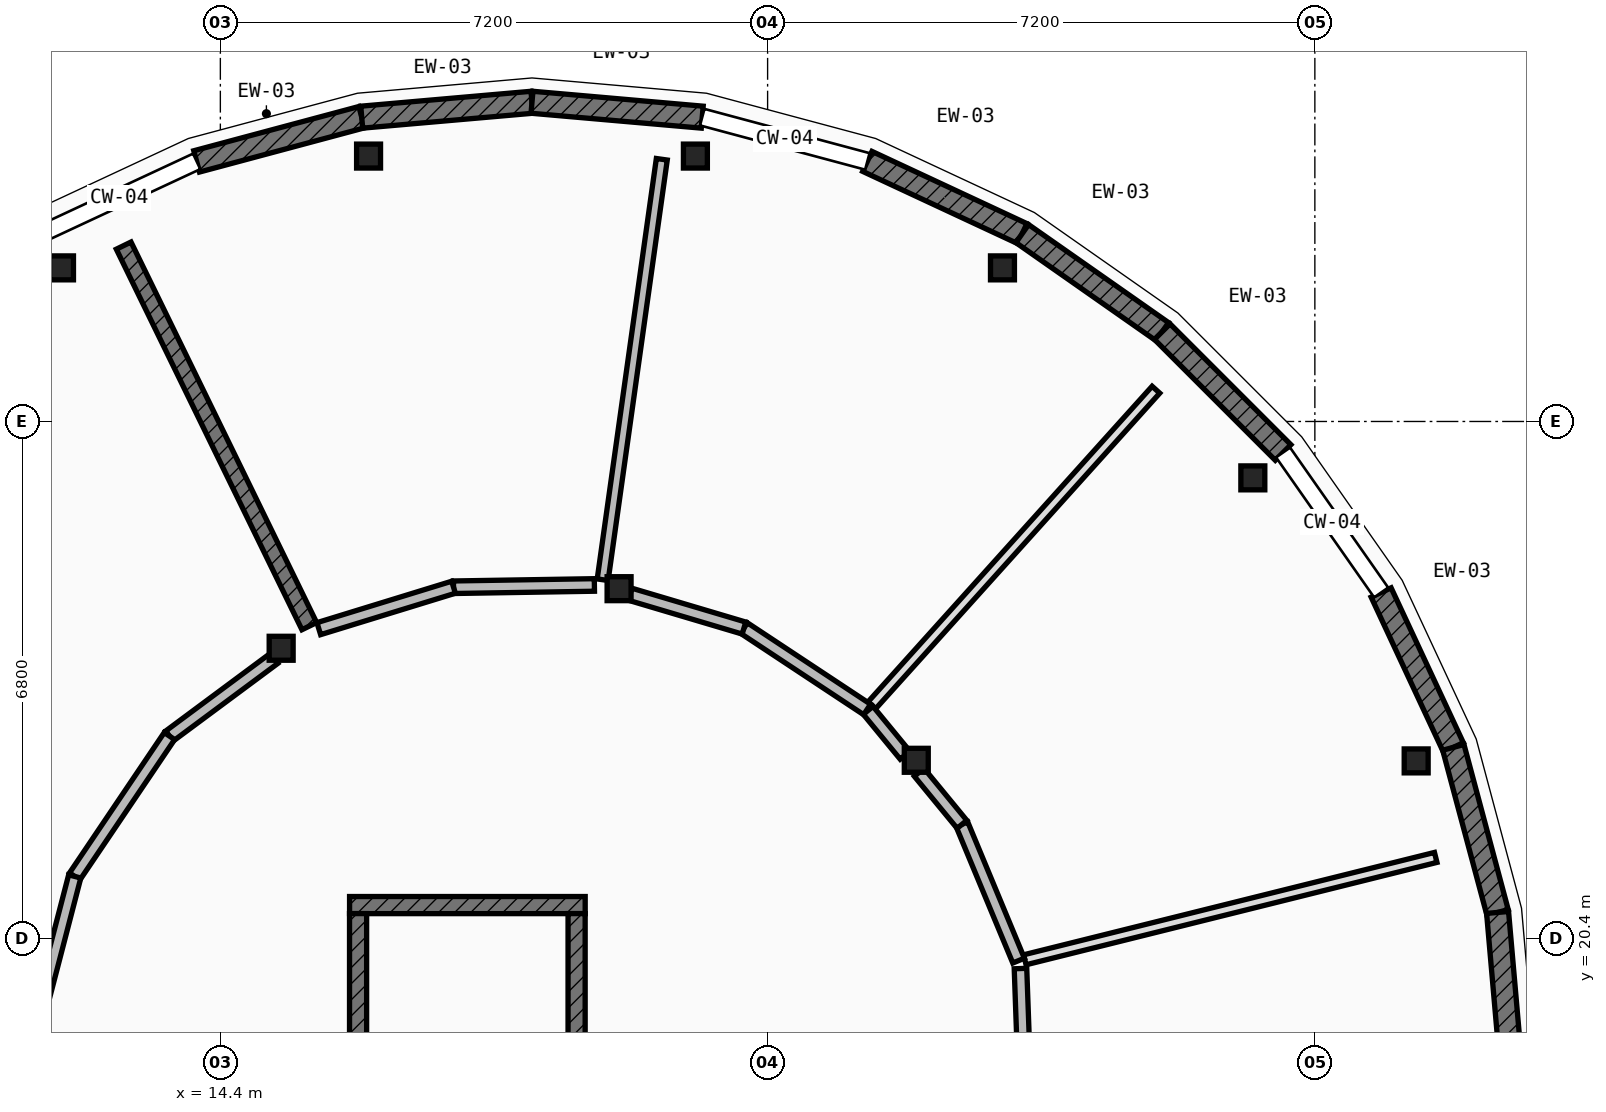
"""IFC4 building model, lengths in metres.
Left out: names, types, materials, properties, quantities, classifications, styles, units other than length and angle.
Written with IfcOpenShell. Run it as: python <this file> out.ifc"""

import sys

from ifc_helpers import new_model, si_unit, direction, frame, frame_2d, origin, origin_2d, place, context, subcontext, project, spatial, rectangle, extrude, element, fill, save


model = new_model("IFC4")
c1 = context("Model", 3, precision=1e-05, world=origin(), true_north=direction((0.0, 1.0)))
c2 = subcontext(c1, "Body", "Model", "MODEL_VIEW")
j1 = project(units=[si_unit("LENGTHUNIT", "METRE"), si_unit("PLANEANGLEUNIT", "RADIAN")], contexts=[c1])
p1 = place(None, origin())
s1 = spatial("IfcSite", under=j1, at=p1, CompositionType="ELEMENT")
p2 = place(p1, origin())
s2 = spatial("IfcBuilding", under=s1, at=p2, CompositionType="ELEMENT")
p3 = place(p2, frame((0.0, 0.0, 12.95)))
s3 = spatial("IfcBuildingStorey", under=s2, at=p3, CompositionType="ELEMENT", Elevation=12.95)
for number, where, z_axis, x_axis in (
    (1, (30.133, 22.734, 0.0), (0.0, 0.0, 1.0), (1.0, 0.0, 0.0)),
    (2, (27.984, 26.458, 0.0), (0.0, 0.0, 1.0), (1.0, 0.0, 0.0)),
    (3, (24.69, 29.221, 0.0), (0.0, 0.0, 1.0), (1.0, 0.0, 0.0)),
    (4, (20.65, 30.692, 0.0), (0.0, 0.0, 1.0), (1.0, 0.0, 0.0)),
    (5, (16.35, 30.692, 0.0), (0.0, 0.0, 1.0), (1.0, 0.0, 0.0)),
    (6, (12.31, 29.221, 0.0), (0.0, 0.0, 1.0), (1.0, 0.0, 0.0)),
    (7, (23.556, 22.742, 0.0), (0.0, 0.0, 1.0), (1.0, 0.0, 0.0)),
    (8, (19.646, 25.0, 0.0), (0.0, 0.0, 1.0), (1.0, 0.0, 0.0)),
    (9, (15.2, 24.216, 0.0), (0.0, 0.0, 1.0), (1.0, 0.0, 0.0)),
):
    element("IfcColumn", number, at=place(p3, frame(where, z_axis=z_axis, x_axis=x_axis)), inside=s3, PredefinedType="COLUMN", context=c2, shape_type="SweptSolid", body=[
        extrude(rectangle(XDim=0.315, YDim=0.315, at=origin_2d()), origin(), (0.0, 0.0, 1.0), 4.2),
    ])
p4 = place(p3, frame((14.088, 30.622, 0.0), z_axis=(0.0, 0.0, 1.0), x_axis=(0.96592430538, 0.258824721145, 0.0)))
e10 = element("IfcWall", 10, at=p4, inside=s3, PredefinedType="ELEMENTEDWALL", context=c2, shape_type="SweptSolid", body=[
    extrude(rectangle(XDim=2.249, YDim=0.29, at=frame_2d((1.125, 0.0))), origin(), (0.0, 0.0, 1.0), 3.349),
])
p5 = place(p4, frame((0.599, 0.0, 0.85)))
e11 = element("IfcOpeningElement", 11, at=p5, cuts=e10, PredefinedType="OPENING", context=c2, shape_type="SweptSolid", body=[
    extrude(rectangle(XDim=1.05, YDim=1.9, at=frame_2d((0.525, 0.95))), frame((0.0, 0.155, 0.0), z_axis=(0.0, -1.0, 0.0), x_axis=(1.0, 0.0, 0.0)), (0.0, 0.0, 1.0), 0.31),
])
p6 = place(p3, frame((16.26, 31.204, 0.0), z_axis=(0.0, 0.0, 1.0), x_axis=(0.996201374201, 0.087079400775, 0.0)))
e12 = element("IfcWall", 12, at=p6, inside=s3, PredefinedType="ELEMENTEDWALL", context=c2, shape_type="SweptSolid", body=[
    extrude(rectangle(XDim=2.249, YDim=0.29, at=frame_2d((1.124, 0.0))), origin(), (0.0, 0.0, 1.0), 3.349),
])
p7 = place(p6, frame((0.599, 0.0, 0.85)))
e13 = element("IfcOpeningElement", 13, at=p7, cuts=e12, PredefinedType="OPENING", context=c2, shape_type="SweptSolid", body=[
    extrude(rectangle(XDim=1.05, YDim=2.15, at=frame_2d((0.525, 1.075))), frame((0.0, 0.155, 0.0), z_axis=(0.0, -1.0, 0.0), x_axis=(1.0, 0.0, 0.0)), (0.0, 0.0, 1.0), 0.31),
])
p8 = place(p3, frame((18.5, 31.4, 0.0), z_axis=(0.0, 0.0, 1.0), x_axis=(0.996201374201, -0.087079400775, 0.0)))
e14 = element("IfcWall", 14, at=p8, inside=s3, PredefinedType="ELEMENTEDWALL", context=c2, shape_type="SweptSolid", body=[
    extrude(rectangle(XDim=2.249, YDim=0.29, at=frame_2d((1.124, 0.0))), origin(), (0.0, 0.0, 1.0), 3.349),
])
p9 = place(p8, frame((0.584, 0.0, 0.85)))
e15 = element("IfcOpeningElement", 15, at=p9, cuts=e14, PredefinedType="OPENING", context=c2, shape_type="SweptSolid", body=[
    extrude(rectangle(XDim=1.08, YDim=1.5, at=frame_2d((0.54, 0.75))), frame((0.0, 0.155, 0.0), z_axis=(0.0, -1.0, 0.0), x_axis=(1.0, 0.0, 0.0)), (0.0, 0.0, 1.0), 0.31),
])
p10 = place(p3, frame((22.912, 30.622, 0.0), z_axis=(0.0, 0.0, 1.0), x_axis=(0.906360600886, -0.422504983593, 0.0)))
e16 = element("IfcWall", 16, at=p10, inside=s3, PredefinedType="ELEMENTEDWALL", context=c2, shape_type="SweptSolid", body=[
    extrude(rectangle(XDim=2.248, YDim=0.29, at=frame_2d((1.124, 0.0))), origin(), (0.0, 0.0, 1.0), 3.349),
])
p11 = place(p10, frame((0.584, 0.0, 0.85)))
e17 = element("IfcOpeningElement", 17, at=p11, cuts=e16, PredefinedType="OPENING", context=c2, shape_type="SweptSolid", body=[
    extrude(rectangle(XDim=1.08, YDim=1.8, at=frame_2d((0.54, 0.9))), frame((0.0, 0.155, 0.0), z_axis=(0.0, -1.0, 0.0), x_axis=(1.0, 0.0, 0.0)), (0.0, 0.0, 1.0), 0.31),
])
p12 = place(p3, frame((24.95, 29.672, 0.0), z_axis=(0.0, 0.0, 1.0), x_axis=(0.819104393925, -0.573644482107, 0.0)))
e18 = element("IfcWall", 18, at=p12, inside=s3, PredefinedType="ELEMENTEDWALL", context=c2, shape_type="SweptSolid", body=[
    extrude(rectangle(XDim=2.249, YDim=0.29, at=frame_2d((1.125, 0.0))), origin(), (0.0, 0.0, 1.0), 3.349),
])
p13 = place(p12, frame((0.574, 0.0, 0.85)))
e19 = element("IfcOpeningElement", 19, at=p13, cuts=e18, PredefinedType="OPENING", context=c2, shape_type="SweptSolid", body=[
    extrude(rectangle(XDim=1.1, YDim=1.25, at=frame_2d((0.55, 0.625))), frame((0.0, 0.155, 0.0), z_axis=(0.0, -1.0, 0.0), x_axis=(1.0, 0.0, 0.0)), (0.0, 0.0, 1.0), 0.31),
])
p14 = place(p3, frame((26.792, 28.382, 0.0), z_axis=(0.0, 0.0, 1.0), x_axis=(0.707106781187, -0.707106781187, 0.0)))
e20 = element("IfcWall", 20, at=p14, inside=s3, PredefinedType="ELEMENTEDWALL", context=c2, shape_type="SweptSolid", body=[
    extrude(rectangle(XDim=2.249, YDim=0.29, at=frame_2d((1.125, 0.0))), origin(), (0.0, 0.0, 1.0), 3.349),
])
p15 = place(p14, frame((0.574, 0.0, 0.85)))
e21 = element("IfcOpeningElement", 21, at=p15, cuts=e20, PredefinedType="OPENING", context=c2, shape_type="SweptSolid", body=[
    extrude(rectangle(XDim=1.1, YDim=1.5, at=frame_2d((0.55, 0.75))), frame((0.0, 0.155, 0.0), z_axis=(0.0, -1.0, 0.0), x_axis=(1.0, 0.0, 0.0)), (0.0, 0.0, 1.0), 0.31),
])
p16 = place(p3, frame((29.672, 24.95, 0.0), z_axis=(0.0, 0.0, 1.0), x_axis=(0.422504983593, -0.906360600886, 0.0)))
e22 = element("IfcWall", 22, at=p16, inside=s3, PredefinedType="ELEMENTEDWALL", context=c2, shape_type="SweptSolid", body=[
    extrude(rectangle(XDim=2.248, YDim=0.29, at=frame_2d((1.124, 0.0))), origin(), (0.0, 0.0, 1.0), 3.349),
])
p17 = place(p16, frame((0.574, 0.0, 0.85)))
e23 = element("IfcOpeningElement", 23, at=p17, cuts=e22, PredefinedType="OPENING", context=c2, shape_type="SweptSolid", body=[
    extrude(rectangle(XDim=1.1, YDim=1.85, at=frame_2d((0.55, 0.925))), frame((0.0, 0.155, 0.0), z_axis=(0.0, -1.0, 0.0), x_axis=(1.0, 0.0, 0.0)), (0.0, 0.0, 1.0), 0.31),
])
p18 = place(p3, frame((30.622, 22.912, 0.0), z_axis=(0.0, 0.0, 1.0), x_axis=(0.258824721145, -0.96592430538, 0.0)))
e24 = element("IfcWall", 24, at=p18, inside=s3, PredefinedType="ELEMENTEDWALL", context=c2, shape_type="SweptSolid", body=[
    extrude(rectangle(XDim=2.249, YDim=0.29, at=frame_2d((1.125, 0.0))), origin(), (0.0, 0.0, 1.0), 3.349),
])
p19 = place(p18, frame((0.574, 0.0, 0.85)))
e25 = element("IfcOpeningElement", 25, at=p19, cuts=e24, PredefinedType="OPENING", context=c2, shape_type="SweptSolid", body=[
    extrude(rectangle(XDim=1.1, YDim=2.1, at=frame_2d((0.55, 1.05))), frame((0.0, 0.155, 0.0), z_axis=(0.0, -1.0, 0.0), x_axis=(1.0, 0.0, 0.0)), (0.0, 0.0, 1.0), 0.31),
])
p20 = place(p3, frame((31.204, 20.74, 0.0), z_axis=(0.0, 0.0, 1.0), x_axis=(0.087079400775, -0.996201374201, 0.0)))
e26 = element("IfcWall", 26, at=p20, inside=s3, PredefinedType="ELEMENTEDWALL", context=c2, shape_type="SweptSolid", body=[
    extrude(rectangle(XDim=2.249, YDim=0.29, at=frame_2d((1.124, 0.0))), origin(), (0.0, 0.0, 1.0), 3.349),
])
p21 = place(p20, frame((0.564, 0.0, 0.85)))
e27 = element("IfcOpeningElement", 27, at=p21, cuts=e26, PredefinedType="OPENING", context=c2, shape_type="SweptSolid", body=[
    extrude(rectangle(XDim=1.12, YDim=1.65, at=frame_2d((0.56, 0.825))), frame((0.0, 0.155, 0.0), z_axis=(0.0, -1.0, 0.0), x_axis=(1.0, 0.0, 0.0)), (0.0, 0.0, 1.0), 0.31),
])
p22 = place(p3, frame((16.1, 20.837, 0.0), z_axis=(0.0, 0.0, 1.0), x_axis=(1.0, 0.0, 0.0)))
e28 = element("IfcWall", 28, at=p22, inside=s3, PredefinedType="SHEAR", context=c2, shape_type="SweptSolid", body=[
    extrude(rectangle(XDim=3.1, YDim=0.225, at=frame_2d((1.55, 0.0))), origin(), (0.0, 0.0, 1.0), 3.995),
])
for number, where, z_axis, x_axis in (
    (29, (16.212, 18.575, 0.0), (0.0, 0.0, 1.0), (0.0, 1.0, 0.0)),
    (30, (19.087, 18.575, 0.0), (0.0, 0.0, 1.0), (0.0, 1.0, 0.0)),
):
    element("IfcWall", number, at=place(p3, frame(where, z_axis=z_axis, x_axis=x_axis)), inside=s3, PredefinedType="SHEAR", context=c2, shape_type="SweptSolid", body=[
        extrude(rectangle(XDim=2.15, YDim=0.225, at=frame_2d((1.075, 0.0))), origin(), (0.0, 0.0, 1.0), 3.995),
    ])
p23 = place(p3, frame((15.57, 24.507, 0.0), z_axis=(0.0, 0.0, 1.0), x_axis=(-0.438391683607, 0.898784029533, 0.0)))
e31 = element("IfcWall", 31, at=p23, inside=s3, PredefinedType="SOLIDWALL", context=c2, shape_type="SweptSolid", body=[
    extrude(rectangle(XDim=5.571, YDim=0.215, at=frame_2d((2.785, 0.0))), origin(), (0.0, 0.0, 1.0), 3.324),
])
p24 = place(p3, frame((24.984, 20.117, 0.0), z_axis=(0.0, 0.0, 1.0), x_axis=(0.970325240459, 0.2418034899, 0.0)))
e32 = element("IfcWall", 32, at=p24, inside=s3, PredefinedType="PLUMBINGWALL", context=c2, shape_type="SweptSolid", body=[
    extrude(rectangle(XDim=5.571, YDim=0.135, at=frame_2d((2.786, 0.0))), origin(), (0.0, 0.0, 1.0), 3.324),
])
p25 = place(p3, frame((22.972, 23.466, 0.0), z_axis=(0.0, 0.0, 1.0), x_axis=(0.669003365604, 0.743259373846, 0.0)))
e33 = element("IfcWall", 33, at=p25, inside=s3, PredefinedType="PLUMBINGWALL", context=c2, shape_type="SweptSolid", body=[
    extrude(rectangle(XDim=5.586, YDim=0.135, at=frame_2d((2.793, 0.0))), origin(), (0.0, 0.0, 1.0), 3.324),
])
p26 = place(p3, frame((19.43, 25.118, 0.0), z_axis=(0.0, 0.0, 1.0), x_axis=(0.139279606871, 0.990253094471, 0.0)))
e34 = element("IfcWall", 34, at=p26, inside=s3, PredefinedType="PARTITIONING", context=c2, shape_type="SweptSolid", body=[
    extrude(rectangle(XDim=5.586, YDim=0.145, at=frame_2d((2.793, 0.0))), origin(), (0.0, 0.0, 1.0), 3.324),
])
p27 = place(p3, frame((15.107, 24.083, 0.0), z_axis=(0.0, 0.0, 1.0), x_axis=(-0.802996920627, -0.595983175487, 0.0)))
e35 = element("IfcWall", 35, at=p27, inside=s3, PredefinedType="PARTITIONING", context=c2, shape_type="SweptSolid", body=[
    extrude(rectangle(XDim=1.715, YDim=0.165, at=frame_2d((0.857, 0.0))), origin(), (0.0, 0.0, 1.0), 3.324),
])
p28 = place(p27, frame((0.407, 0.0, 0.0)))
e36 = element("IfcOpeningElement", 36, at=p28, cuts=e35, PredefinedType="OPENING", context=c2, shape_type="SweptSolid", body=[
    extrude(rectangle(XDim=0.9, YDim=2.1, at=frame_2d((0.45, 1.05))), frame((0.0, 0.093, 0.0), z_axis=(0.0, -1.0, 0.0), x_axis=(1.0, 0.0, 0.0)), (0.0, 0.0, 1.0), 0.185),
])
p29 = place(p3, frame((13.73, 23.061, 0.0), z_axis=(0.0, 0.0, 1.0), x_axis=(-0.559294051813, -0.828969338159, 0.0)))
e37 = element("IfcWall", 37, at=p29, inside=s3, PredefinedType="PARTITIONING", context=c2, shape_type="SweptSolid", body=[
    extrude(rectangle(XDim=2.228, YDim=0.165, at=frame_2d((1.114, 0.0))), origin(), (0.0, 0.0, 1.0), 3.324),
])
p30 = place(p3, frame((12.484, 21.214, 0.0), z_axis=(0.0, 0.0, 1.0), x_axis=(-0.251319689769, -0.967904134475, 0.0)))
e38 = element("IfcWall", 38, at=p30, inside=s3, PredefinedType="PARTITIONING", context=c2, shape_type="SweptSolid", body=[
    extrude(rectangle(XDim=2.228, YDim=0.165, at=frame_2d((1.114, 0.0))), origin(), (0.0, 0.0, 1.0), 3.324),
])
p31 = place(p3, frame((24.977, 18.606, 0.0), z_axis=(0.0, 0.0, 1.0), x_axis=(-0.035828677701, 0.999357946811, 0.0)))
e39 = element("IfcWall", 39, at=p31, inside=s3, PredefinedType="PARTITIONING", context=c2, shape_type="SweptSolid", body=[
    extrude(rectangle(XDim=1.397, YDim=0.165, at=frame_2d((0.698, 0.0))), origin(), (0.0, 0.0, 1.0), 3.324),
])
p32 = place(p3, frame((24.902, 20.106, 0.0), z_axis=(0.0, 0.0, 1.0), x_axis=(-0.383758104383, 0.923433656155, 0.0)))
e40 = element("IfcWall", 40, at=p32, inside=s3, PredefinedType="PARTITIONING", context=c2, shape_type="SweptSolid", body=[
    extrude(rectangle(XDim=1.942, YDim=0.165, at=frame_2d((0.971, 0.0))), origin(), (0.0, 0.0, 1.0), 3.324),
])
p33 = place(p32, frame((0.481, 0.0, 0.0)))
e41 = element("IfcOpeningElement", 41, at=p33, cuts=e40, PredefinedType="OPENING", context=c2, shape_type="SweptSolid", body=[
    extrude(rectangle(XDim=0.98, YDim=2.1, at=frame_2d((0.49, 1.05))), frame((0.0, 0.093, 0.0), z_axis=(0.0, -1.0, 0.0), x_axis=(1.0, 0.0, 0.0)), (0.0, 0.0, 1.0), 0.185),
])
p34 = place(p3, frame((24.157, 21.899, 0.0), z_axis=(0.0, 0.0, 1.0), x_axis=(-0.634915552235, 0.772581543612, 0.0)))
e42 = element("IfcWall", 42, at=p34, inside=s3, PredefinedType="PARTITIONING", context=c2, shape_type="SweptSolid", body=[
    extrude(rectangle(XDim=0.887, YDim=0.165, at=frame_2d((0.443, 0.0))), origin(), (0.0, 0.0, 1.0), 3.324),
])
p35 = place(p3, frame((23.408, 22.809, 0.0), z_axis=(0.0, 0.0, 1.0), x_axis=(-0.635012128366, 0.772502166229, 0.0)))
e43 = element("IfcWall", 43, at=p35, inside=s3, PredefinedType="PARTITIONING", context=c2, shape_type="SweptSolid", body=[
    extrude(rectangle(XDim=0.763, YDim=0.165, at=frame_2d((0.382, 0.0))), origin(), (0.0, 0.0, 1.0), 3.324),
])
p36 = place(p3, frame((22.909, 23.411, 0.0), z_axis=(0.0, 0.0, 1.0), x_axis=(-0.834152513301, 0.551533847152, 0.0)))
e44 = element("IfcWall", 44, at=p36, inside=s3, PredefinedType="PARTITIONING", context=c2, shape_type="SweptSolid", body=[
    extrude(rectangle(XDim=1.942, YDim=0.165, at=frame_2d((0.971, 0.0))), origin(), (0.0, 0.0, 1.0), 3.324),
])
p37 = place(p36, frame((0.521, 0.0, 0.0)))
e45 = element("IfcOpeningElement", 45, at=p37, cuts=e44, PredefinedType="OPENING", context=c2, shape_type="SweptSolid", body=[
    extrude(rectangle(XDim=0.9, YDim=2.1, at=frame_2d((0.45, 1.05))), frame((0.0, 0.093, 0.0), z_axis=(0.0, -1.0, 0.0), x_axis=(1.0, 0.0, 0.0)), (0.0, 0.0, 1.0), 0.185),
])
p38 = place(p3, frame((21.289, 24.482, 0.0), z_axis=(0.0, 0.0, 1.0), x_axis=(-0.958588240181, 0.284795691305, 0.0)))
e46 = element("IfcWall", 46, at=p38, inside=s3, PredefinedType="PARTITIONING", context=c2, shape_type="SweptSolid", body=[
    extrude(rectangle(XDim=1.563, YDim=0.165, at=frame_2d((0.781, 0.0))), origin(), (0.0, 0.0, 1.0), 3.324),
])
p39 = place(p3, frame((19.321, 25.049, 0.0), z_axis=(0.0, 0.0, 1.0), x_axis=(-0.999868716198, -0.016203406073, 0.0)))
e47 = element("IfcWall", 47, at=p39, inside=s3, PredefinedType="PARTITIONING", context=c2, shape_type="SweptSolid", body=[
    extrude(rectangle(XDim=1.853, YDim=0.165, at=frame_2d((0.927, 0.0))), origin(), (0.0, 0.0, 1.0), 3.324),
])
p40 = place(p39, frame((0.412, 0.0, 0.0)))
e48 = element("IfcOpeningElement", 48, at=p40, cuts=e47, PredefinedType="OPENING", context=c2, shape_type="SweptSolid", body=[
    extrude(rectangle(XDim=1.03, YDim=2.18, at=frame_2d((0.515, 1.09))), frame((0.0, 0.093, 0.0), z_axis=(0.0, -1.0, 0.0), x_axis=(1.0, 0.0, 0.0)), (0.0, 0.0, 1.0), 0.185),
])
p41 = place(p3, frame((17.468, 25.019, 0.0), z_axis=(0.0, 0.0, 1.0), x_axis=(-0.955870034048, -0.293789853483, 0.0)))
e49 = element("IfcWall", 49, at=p41, inside=s3, PredefinedType="PARTITIONING", context=c2, shape_type="SweptSolid", body=[
    extrude(rectangle(XDim=1.855, YDim=0.165, at=frame_2d((0.927, 0.0))), origin(), (0.0, 0.0, 1.0), 3.324),
])
p42 = place(p5, origin())
e50 = element("IfcWindow", 50, at=p42, inside=s3, PartitioningType="SINGLE_PANEL", PredefinedType="WINDOW", context=c2, shape_type="SweptSolid", body=[
    extrude(rectangle(XDim=1.05, YDim=1.9, at=frame_2d((0.525, 0.95))), frame((0.0, 0.03, 0.0), z_axis=(0.0, -1.0, 0.0), x_axis=(1.0, 0.0, 0.0)), (0.0, 0.0, 1.0), 0.06),
])
fill(e11, e50)
p43 = place(p7, origin())
e51 = element("IfcWindow", 51, at=p43, inside=s3, PartitioningType="SINGLE_PANEL", PredefinedType="WINDOW", context=c2, shape_type="SweptSolid", body=[
    extrude(rectangle(XDim=1.05, YDim=2.15, at=frame_2d((0.525, 1.075))), frame((0.0, 0.03, 0.0), z_axis=(0.0, -1.0, 0.0), x_axis=(1.0, 0.0, 0.0)), (0.0, 0.0, 1.0), 0.06),
])
fill(e13, e51)
p44 = place(p9, origin())
e52 = element("IfcWindow", 52, at=p44, inside=s3, PartitioningType="SINGLE_PANEL", PredefinedType="WINDOW", context=c2, shape_type="SweptSolid", body=[
    extrude(rectangle(XDim=1.08, YDim=1.5, at=frame_2d((0.54, 0.75))), frame((0.0, 0.03, 0.0), z_axis=(0.0, -1.0, 0.0), x_axis=(1.0, 0.0, 0.0)), (0.0, 0.0, 1.0), 0.06),
])
fill(e15, e52)
p45 = place(p11, origin())
e53 = element("IfcWindow", 53, at=p45, inside=s3, PartitioningType="SINGLE_PANEL", PredefinedType="WINDOW", context=c2, shape_type="SweptSolid", body=[
    extrude(rectangle(XDim=1.08, YDim=1.8, at=frame_2d((0.54, 0.9))), frame((0.0, 0.03, 0.0), z_axis=(0.0, -1.0, 0.0), x_axis=(1.0, 0.0, 0.0)), (0.0, 0.0, 1.0), 0.06),
])
fill(e17, e53)
p46 = place(p13, origin())
e54 = element("IfcWindow", 54, at=p46, inside=s3, PartitioningType="SINGLE_PANEL", PredefinedType="WINDOW", context=c2, shape_type="SweptSolid", body=[
    extrude(rectangle(XDim=1.1, YDim=1.25, at=frame_2d((0.55, 0.625))), frame((0.0, 0.03, 0.0), z_axis=(0.0, -1.0, 0.0), x_axis=(1.0, 0.0, 0.0)), (0.0, 0.0, 1.0), 0.06),
])
fill(e19, e54)
p47 = place(p15, origin())
e55 = element("IfcWindow", 55, at=p47, inside=s3, PartitioningType="SINGLE_PANEL", PredefinedType="WINDOW", context=c2, shape_type="SweptSolid", body=[
    extrude(rectangle(XDim=1.1, YDim=1.5, at=frame_2d((0.55, 0.75))), frame((0.0, 0.03, 0.0), z_axis=(0.0, -1.0, 0.0), x_axis=(1.0, 0.0, 0.0)), (0.0, 0.0, 1.0), 0.06),
])
fill(e21, e55)
p48 = place(p17, origin())
e56 = element("IfcWindow", 56, at=p48, inside=s3, PartitioningType="SINGLE_PANEL", PredefinedType="WINDOW", context=c2, shape_type="SweptSolid", body=[
    extrude(rectangle(XDim=1.1, YDim=1.85, at=frame_2d((0.55, 0.925))), frame((0.0, 0.03, 0.0), z_axis=(0.0, -1.0, 0.0), x_axis=(1.0, 0.0, 0.0)), (0.0, 0.0, 1.0), 0.06),
])
fill(e23, e56)
p49 = place(p19, origin())
e57 = element("IfcWindow", 57, at=p49, inside=s3, PartitioningType="SINGLE_PANEL", PredefinedType="WINDOW", context=c2, shape_type="SweptSolid", body=[
    extrude(rectangle(XDim=1.1, YDim=2.1, at=frame_2d((0.55, 1.05))), frame((0.0, 0.03, 0.0), z_axis=(0.0, -1.0, 0.0), x_axis=(1.0, 0.0, 0.0)), (0.0, 0.0, 1.0), 0.06),
])
fill(e25, e57)
p50 = place(p21, origin())
e58 = element("IfcWindow", 58, at=p50, inside=s3, PartitioningType="SINGLE_PANEL", PredefinedType="WINDOW", context=c2, shape_type="SweptSolid", body=[
    extrude(rectangle(XDim=1.12, YDim=1.65, at=frame_2d((0.56, 0.825))), frame((0.0, 0.03, 0.0), z_axis=(0.0, -1.0, 0.0), x_axis=(1.0, 0.0, 0.0)), (0.0, 0.0, 1.0), 0.06),
])
fill(e27, e58)
p51 = place(p28, origin())
e59 = element("IfcDoor", 59, at=p51, inside=s3, OperationType="SINGLE_SWING_LEFT", PredefinedType="DOOR", context=c2, shape_type="SweptSolid", body=[
    extrude(rectangle(XDim=0.9, YDim=2.1, at=frame_2d((0.45, 1.05))), frame((0.0, 0.025, 0.0), z_axis=(0.0, -1.0, 0.0), x_axis=(1.0, 0.0, 0.0)), (0.0, 0.0, 1.0), 0.05),
])
fill(e36, e59)
p52 = place(p33, origin())
e60 = element("IfcDoor", 60, at=p52, inside=s3, OperationType="SINGLE_SWING_RIGHT", PredefinedType="DOOR", context=c2, shape_type="SweptSolid", body=[
    extrude(rectangle(XDim=0.98, YDim=2.1, at=frame_2d((0.49, 1.05))), frame((0.0, 0.025, 0.0), z_axis=(0.0, -1.0, 0.0), x_axis=(1.0, 0.0, 0.0)), (0.0, 0.0, 1.0), 0.05),
])
fill(e41, e60)
p53 = place(p37, origin())
e61 = element("IfcDoor", 61, at=p53, inside=s3, OperationType="SINGLE_SWING_LEFT", PredefinedType="DOOR", context=c2, shape_type="SweptSolid", body=[
    extrude(rectangle(XDim=0.9, YDim=2.1, at=frame_2d((0.45, 1.05))), frame((0.0, 0.025, 0.0), z_axis=(0.0, -1.0, 0.0), x_axis=(1.0, 0.0, 0.0)), (0.0, 0.0, 1.0), 0.05),
])
fill(e45, e61)
p54 = place(p40, origin())
e62 = element("IfcDoor", 62, at=p54, inside=s3, OperationType="SINGLE_SWING_RIGHT", PredefinedType="DOOR", context=c2, shape_type="SweptSolid", body=[
    extrude(rectangle(XDim=1.03, YDim=2.18, at=frame_2d((0.515, 1.09))), frame((0.0, 0.025, 0.0), z_axis=(0.0, -1.0, 0.0), x_axis=(1.0, 0.0, 0.0)), (0.0, 0.0, 1.0), 0.05),
])
fill(e48, e62)
save(model, sys.argv[1])
